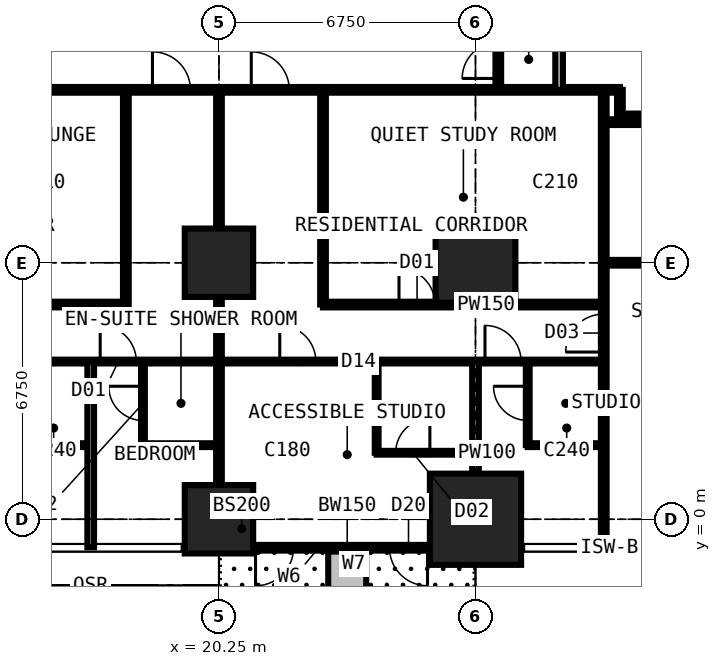
"""IFC4 building model, lengths in metres.
Left out: names, types, materials, properties, quantities, classifications, styles, units other than length and angle.
Written with IfcOpenShell. Run it as: python <this file> out.ifc"""

import sys

from ifc_helpers import new_model, si_unit, direction, frame, frame_2d, origin, origin_2d, place, context, subcontext, project, spatial, rectangle, extrude, element, fill, save


model = new_model("IFC4")
c1 = context("Model", 3, precision=1e-05, world=origin(), true_north=direction((0.0, 1.0)))
c2 = subcontext(c1, "Body", "Model", "MODEL_VIEW")
j1 = project(units=[si_unit("LENGTHUNIT", "METRE"), si_unit("PLANEANGLEUNIT", "RADIAN")], contexts=[c1])
p1 = place(None, origin())
s1 = spatial("IfcSite", under=j1, at=p1, CompositionType="ELEMENT")
p2 = place(p1, origin())
s2 = spatial("IfcBuilding", under=s1, at=p2, CompositionType="ELEMENT")
p3 = place(p2, frame((0.0, 0.0, 83.7)))
s3 = spatial("IfcBuildingStorey", under=s2, at=p3, CompositionType="ELEMENT", Elevation=83.7)
for number, where, z_axis, x_axis in (
    (1, (20.25, 0.0, 0.0), (0.0, 0.0, 1.0), (1.0, 0.0, 0.0)),
    (2, (20.25, 6.75, 0.0), (0.0, 0.0, 1.0), (1.0, 0.0, 0.0)),
):
    element("IfcColumn", number, at=place(p3, frame(where, z_axis=z_axis, x_axis=x_axis)), inside=s3, PredefinedType="COLUMN", context=c2, shape_type="SweptSolid", body=[
        extrude(rectangle(XDim=1.8, YDim=1.8, at=origin_2d()), origin(), (0.0, 0.0, 1.0), 3.6),
    ])
p4 = place(p3, frame((27.0, 0.0, 0.0), z_axis=(0.0, 0.0, 1.0), x_axis=(1.0, 0.0, 0.0)))
e3 = element("IfcColumn", 3, at=p4, inside=s3, PredefinedType="COLUMN", context=c2, shape_type="SweptSolid", body=[
    extrude(rectangle(XDim=2.4, YDim=2.4, at=origin_2d()), origin(), (0.0, 0.0, 1.0), 3.6),
])
p5 = place(p3, frame((27.0, 6.75, 0.0), z_axis=(0.0, 0.0, 1.0), x_axis=(1.0, 0.0, 0.0)))
e4 = element("IfcColumn", 4, at=p5, inside=s3, PredefinedType="COLUMN", context=c2, shape_type="SweptSolid", body=[
    extrude(rectangle(XDim=2.1, YDim=2.1, at=origin_2d()), origin(), (0.0, 0.0, 1.0), 3.6),
])
p6 = place(p3, frame((27.0, -0.75, 0.0), z_axis=(0.0, 0.0, 1.0), x_axis=(-1.0, 0.0, 0.0)))
e5 = element("IfcWall", 5, at=p6, inside=s3, PredefinedType="SOLIDWALL", context=c2, shape_type="SweptSolid", body=[
    extrude(rectangle(XDim=6.75, YDim=0.15, at=frame_2d((3.375, 0.0))), origin(), (0.0, 0.0, 1.0), 3.375),
])
p7 = place(p6, frame((1.262, 0.0, 0.0)))
e6 = element("IfcOpeningElement", 6, at=p7, cuts=e5, PredefinedType="OPENING", context=c2, shape_type="SweptSolid", body=[
    extrude(rectangle(XDim=1.0, YDim=2.2, at=frame_2d((0.5, 1.1))), frame((0.0, 0.085, 0.0), z_axis=(0.0, -1.0, 0.0), x_axis=(1.0, 0.0, 0.0)), (0.0, 0.0, 1.0), 0.17),
])
p8 = place(p6, frame((2.325, 0.0, 0.9)))
e7 = element("IfcOpeningElement", 7, at=p8, cuts=e5, PredefinedType="OPENING", context=c2, shape_type="SweptSolid", body=[
    extrude(rectangle(XDim=0.9, YDim=1.8, at=frame_2d((0.45, 0.9))), frame((0.0, 0.085, 0.0), z_axis=(0.0, -1.0, 0.0), x_axis=(1.0, 0.0, 0.0)), (0.0, 0.0, 1.0), 0.17),
])
p9 = place(p6, frame((4.788, 0.0, 0.0)))
e8 = element("IfcOpeningElement", 8, at=p9, cuts=e5, PredefinedType="OPENING", context=c2, shape_type="SweptSolid", body=[
    extrude(rectangle(XDim=1.0, YDim=2.2, at=frame_2d((0.5, 1.1))), frame((0.0, 0.085, 0.0), z_axis=(0.0, -1.0, 0.0), x_axis=(1.0, 0.0, 0.0)), (0.0, 0.0, 1.0), 0.17),
])
p10 = place(p6, frame((3.525, 0.0, 0.9)))
e9 = element("IfcOpeningElement", 9, at=p10, cuts=e5, PredefinedType="OPENING", context=c2, shape_type="SweptSolid", body=[
    extrude(rectangle(XDim=1.2, YDim=1.8, at=frame_2d((0.6, 0.9))), frame((0.0, 0.085, 0.0), z_axis=(0.0, -1.0, 0.0), x_axis=(1.0, 0.0, 0.0)), (0.0, 0.0, 1.0), 0.17),
])
p11 = place(p3, frame((23.625, -0.85, 0.0), z_axis=(0.0, 0.0, 1.0), x_axis=(0.0, -1.0, 0.0)))
e10 = element("IfcWall", 10, at=p11, inside=s3, PredefinedType="USERDEFINED", context=c2, shape_type="SweptSolid", body=[
    extrude(rectangle(XDim=2.2, YDim=1.0, at=frame_2d((1.1, 0.0))), origin(), (0.0, 0.0, 1.0), 0.9),
])
p12 = place(p3, frame((6.75, 4.15, 0.0), z_axis=(0.0, 0.0, 1.0), x_axis=(1.0, 0.0, 0.0)))
e11 = element("IfcWall", 11, at=p12, inside=s3, PredefinedType="PARTITIONING", context=c2, shape_type="SweptSolid", body=[
    extrude(rectangle(XDim=23.625, YDim=0.1, at=frame_2d((11.812, 0.0))), origin(), (0.0, 0.0, 1.0), 3.375),
])
p13 = place(p12, frame((0.2, 0.0, 0.0)))
e12 = element("IfcOpeningElement", 12, at=p13, cuts=e11, PredefinedType="OPENING", context=c2, shape_type="SweptSolid", body=[
    extrude(rectangle(XDim=0.95, YDim=2.2, at=frame_2d((0.475, 1.1))), frame((0.0, 0.06, 0.0), z_axis=(0.0, -1.0, 0.0), x_axis=(1.0, 0.0, 0.0)), (0.0, 0.0, 1.0), 0.12),
])
p14 = place(p12, frame((3.625, 0.0, 0.0)))
e13 = element("IfcOpeningElement", 13, at=p14, cuts=e11, PredefinedType="OPENING", context=c2, shape_type="SweptSolid", body=[
    extrude(rectangle(XDim=0.95, YDim=2.2, at=frame_2d((0.475, 1.1))), frame((0.0, 0.06, 0.0), z_axis=(0.0, -1.0, 0.0), x_axis=(1.0, 0.0, 0.0)), (0.0, 0.0, 1.0), 0.12),
])
p15 = place(p12, frame((7.0, 0.0, 0.0)))
e14 = element("IfcOpeningElement", 14, at=p15, cuts=e11, PredefinedType="OPENING", context=c2, shape_type="SweptSolid", body=[
    extrude(rectangle(XDim=0.95, YDim=2.2, at=frame_2d((0.475, 1.1))), frame((0.0, 0.06, 0.0), z_axis=(0.0, -1.0, 0.0), x_axis=(1.0, 0.0, 0.0)), (0.0, 0.0, 1.0), 0.12),
])
p16 = place(p12, frame((10.375, 0.0, 0.0)))
e15 = element("IfcOpeningElement", 15, at=p16, cuts=e11, PredefinedType="OPENING", context=c2, shape_type="SweptSolid", body=[
    extrude(rectangle(XDim=0.95, YDim=2.2, at=frame_2d((0.475, 1.1))), frame((0.0, 0.06, 0.0), z_axis=(0.0, -1.0, 0.0), x_axis=(1.0, 0.0, 0.0)), (0.0, 0.0, 1.0), 0.12),
])
p17 = place(p12, frame((15.1, 0.0, 0.0)))
e16 = element("IfcOpeningElement", 16, at=p17, cuts=e11, PredefinedType="OPENING", context=c2, shape_type="SweptSolid", body=[
    extrude(rectangle(XDim=0.95, YDim=2.2, at=frame_2d((0.475, 1.1))), frame((0.0, 0.06, 0.0), z_axis=(0.0, -1.0, 0.0), x_axis=(1.0, 0.0, 0.0)), (0.0, 0.0, 1.0), 0.12),
])
p18 = place(p12, frame((20.5, 0.0, 0.0)))
e17 = element("IfcOpeningElement", 17, at=p18, cuts=e11, PredefinedType="OPENING", context=c2, shape_type="SweptSolid", body=[
    extrude(rectangle(XDim=0.95, YDim=2.2, at=frame_2d((0.475, 1.1))), frame((0.0, 0.06, 0.0), z_axis=(0.0, -1.0, 0.0), x_axis=(1.0, 0.0, 0.0)), (0.0, 0.0, 1.0), 0.12),
])
p19 = place(p3, frame((9.2, 5.65, 0.0), z_axis=(0.0, 0.0, 1.0), x_axis=(1.0, 0.0, 0.0)))
e18 = element("IfcWall", 18, at=p19, inside=s3, PredefinedType="PARTITIONING", context=c2, shape_type="SweptSolid", body=[
    extrude(rectangle(XDim=8.6, YDim=0.15, at=frame_2d((4.3, 0.0))), origin(), (0.0, 0.0, 1.0), 3.375),
])
p20 = place(p3, frame((10.125, 11.3, 0.0), z_axis=(0.0, 0.0, 1.0), x_axis=(1.0, 0.0, 0.0)))
e19 = element("IfcWall", 19, at=p20, inside=s3, PredefinedType="PARTITIONING", context=c2, shape_type="SweptSolid", body=[
    extrude(rectangle(XDim=20.675, YDim=0.15, at=frame_2d((10.337, 0.0))), origin(), (0.0, 0.0, 1.0), 3.375),
])
p21 = place(p20, frame((8.375, 0.0, 0.0)))
e20 = element("IfcOpeningElement", 20, at=p21, cuts=e19, PredefinedType="OPENING", context=c2, shape_type="SweptSolid", body=[
    extrude(rectangle(XDim=1.0, YDim=2.2, at=frame_2d((0.5, 1.1))), frame((0.0, 0.085, 0.0), z_axis=(0.0, -1.0, 0.0), x_axis=(1.0, 0.0, 0.0)), (0.0, 0.0, 1.0), 0.17),
])
p22 = place(p20, frame((10.975, 0.0, 0.0)))
e21 = element("IfcOpeningElement", 21, at=p22, cuts=e19, PredefinedType="OPENING", context=c2, shape_type="SweptSolid", body=[
    extrude(rectangle(XDim=1.0, YDim=2.2, at=frame_2d((0.5, 1.1))), frame((0.0, 0.085, 0.0), z_axis=(0.0, -1.0, 0.0), x_axis=(1.0, 0.0, 0.0)), (0.0, 0.0, 1.0), 0.17),
])
p23 = place(p20, frame((3.925, 0.0, 0.0)))
e22 = element("IfcOpeningElement", 22, at=p23, cuts=e19, PredefinedType="OPENING", context=c2, shape_type="SweptSolid", body=[
    extrude(rectangle(XDim=0.95, YDim=2.2, at=frame_2d((0.475, 1.1))), frame((0.0, 0.085, 0.0), z_axis=(0.0, -1.0, 0.0), x_axis=(1.0, 0.0, 0.0)), (0.0, 0.0, 1.0), 0.17),
])
p24 = place(p3, frame((14.875, 1.95, 0.0), z_axis=(0.0, 0.0, 1.0), x_axis=(1.0, 0.0, 0.0)))
e23 = element("IfcWall", 23, at=p24, inside=s3, PredefinedType="PARTITIONING", context=c2, shape_type="SweptSolid", body=[
    extrude(rectangle(XDim=2.0, YDim=0.1, at=frame_2d((1.0, 0.0))), origin(), (0.0, 0.0, 1.0), 3.375),
])
p25 = place(p3, frame((16.875, -0.734, 0.0), z_axis=(0.0, 0.0, 1.0), x_axis=(0.0, 1.0, 0.0)))
e24 = element("IfcWall", 24, at=p25, inside=s3, PredefinedType="PARTITIONING", context=c2, shape_type="SweptSolid", body=[
    extrude(rectangle(XDim=4.884, YDim=0.175, at=frame_2d((2.442, 0.0))), origin(), (0.0, 0.0, 1.0), 3.375),
])
p26 = place(p3, frame((17.8, 5.65, 0.0), z_axis=(0.0, 0.0, 1.0), x_axis=(0.0, 1.0, 0.0)))
e25 = element("IfcWall", 25, at=p26, inside=s3, PredefinedType="PARTITIONING", context=c2, shape_type="SweptSolid", body=[
    extrude(rectangle(XDim=5.65, YDim=0.15, at=frame_2d((2.825, 0.0))), origin(), (0.0, 0.0, 1.0), 3.375),
])
p27 = place(p3, frame((18.25, 1.95, 0.0), z_axis=(0.0, 0.0, 1.0), x_axis=(0.0, 1.0, 0.0)))
e26 = element("IfcWall", 26, at=p27, inside=s3, PredefinedType="PARTITIONING", context=c2, shape_type="SweptSolid", body=[
    extrude(rectangle(XDim=2.2, YDim=0.1, at=frame_2d((1.1, 0.0))), origin(), (0.0, 0.0, 1.0), 3.375),
])
p28 = place(p27, frame((0.65, 0.0, 0.0)))
e27 = element("IfcOpeningElement", 27, at=p28, cuts=e26, PredefinedType="OPENING", context=c2, shape_type="SweptSolid", body=[
    extrude(rectangle(XDim=0.9, YDim=2.2, at=frame_2d((0.45, 1.1))), frame((0.0, 0.06, 0.0), z_axis=(0.0, -1.0, 0.0), x_axis=(1.0, 0.0, 0.0)), (0.0, 0.0, 1.0), 0.12),
])
p29 = place(p3, frame((18.25, 1.95, 0.0), z_axis=(0.0, 0.0, 1.0), x_axis=(1.0, 0.0, 0.0)))
e28 = element("IfcWall", 28, at=p29, inside=s3, PredefinedType="PARTITIONING", context=c2, shape_type="SweptSolid", body=[
    extrude(rectangle(XDim=2.0, YDim=0.1, at=frame_2d((1.0, 0.0))), origin(), (0.0, 0.0, 1.0), 3.375),
])
p30 = place(p3, frame((20.25, -0.734, 0.0), z_axis=(0.0, 0.0, 1.0), x_axis=(0.0, 1.0, 0.0)))
e29 = element("IfcWall", 29, at=p30, inside=s3, PredefinedType="PARTITIONING", context=c2, shape_type="SweptSolid", body=[
    extrude(rectangle(XDim=12.034, YDim=0.15, at=frame_2d((6.017, 0.0))), origin(), (0.0, 0.0, 1.0), 2.61),
])
p31 = place(p3, frame((22.988, 5.65, 0.0), z_axis=(0.0, 0.0, 1.0), x_axis=(1.0, 0.0, 0.0)))
e30 = element("IfcWall", 30, at=p31, inside=s3, PredefinedType="PARTITIONING", context=c2, shape_type="SweptSolid", body=[
    extrude(rectangle(XDim=7.387, YDim=0.15, at=frame_2d((3.694, 0.0))), origin(), (0.0, 0.0, 1.0), 3.375),
])
p32 = place(p31, frame((2.0, 0.0, 0.0)))
e31 = element("IfcOpeningElement", 31, at=p32, cuts=e30, PredefinedType="OPENING", context=c2, shape_type="SweptSolid", body=[
    extrude(rectangle(XDim=0.95, YDim=2.2, at=frame_2d((0.475, 1.1))), frame((0.0, 0.085, 0.0), z_axis=(0.0, -1.0, 0.0), x_axis=(1.0, 0.0, 0.0)), (0.0, 0.0, 1.0), 0.17),
])
p33 = place(p3, frame((22.988, 5.65, 0.0), z_axis=(0.0, 0.0, 1.0), x_axis=(0.0, 1.0, 0.0)))
e32 = element("IfcWall", 32, at=p33, inside=s3, PredefinedType="PARTITIONING", context=c2, shape_type="SweptSolid", body=[
    extrude(rectangle(XDim=5.65, YDim=0.15, at=frame_2d((2.825, 0.0))), origin(), (0.0, 0.0, 1.0), 3.375),
])
p34 = place(p3, frame((24.4, 1.75, 0.0), z_axis=(0.0, 0.0, 1.0), x_axis=(0.0, 1.0, 0.0)))
e33 = element("IfcWall", 33, at=p34, inside=s3, PredefinedType="PARTITIONING", context=c2, shape_type="SweptSolid", body=[
    extrude(rectangle(XDim=2.4, YDim=0.1, at=frame_2d((1.2, 0.0))), origin(), (0.0, 0.0, 1.0), 3.375),
])
p35 = place(p3, frame((24.4, 1.75, 0.0), z_axis=(0.0, 0.0, 1.0), x_axis=(1.0, 0.0, 0.0)))
e34 = element("IfcWall", 34, at=p35, inside=s3, PredefinedType="PARTITIONING", context=c2, shape_type="SweptSolid", body=[
    extrude(rectangle(XDim=2.6, YDim=0.1, at=frame_2d((1.3, 0.0))), origin(), (0.0, 0.0, 1.0), 3.375),
])
p36 = place(p35, frame((0.5, 0.0, 0.0)))
e35 = element("IfcOpeningElement", 35, at=p36, cuts=e34, PredefinedType="OPENING", context=c2, shape_type="SweptSolid", body=[
    extrude(rectangle(XDim=0.9, YDim=2.2, at=frame_2d((0.45, 1.1))), frame((0.0, 0.06, 0.0), z_axis=(0.0, -1.0, 0.0), x_axis=(1.0, 0.0, 0.0)), (0.0, 0.0, 1.0), 0.12),
])
p37 = place(p3, frame((27.0, -0.734, 0.0), z_axis=(0.0, 0.0, 1.0), x_axis=(0.0, 1.0, 0.0)))
e36 = element("IfcWall", 36, at=p37, inside=s3, PredefinedType="PARTITIONING", context=c2, shape_type="SweptSolid", body=[
    extrude(rectangle(XDim=4.884, YDim=0.175, at=frame_2d((2.442, 0.0))), origin(), (0.0, 0.0, 1.0), 2.877),
])
p38 = place(p3, frame((27.6, 11.3, 0.0), z_axis=(0.0, 0.0, 1.0), x_axis=(0.0, 1.0, 0.0)))
e37 = element("IfcWall", 37, at=p38, inside=s3, PredefinedType="PARTITIONING", context=c2, shape_type="SweptSolid", body=[
    extrude(rectangle(XDim=1.6, YDim=0.15, at=frame_2d((0.8, 0.0))), origin(), (0.0, 0.0, 1.0), 3.375),
])
p39 = place(p38, frame((0.3, 0.0, 0.0)))
e38 = element("IfcOpeningElement", 38, at=p39, cuts=e37, PredefinedType="OPENING", context=c2, shape_type="SweptSolid", body=[
    extrude(rectangle(XDim=0.95, YDim=2.2, at=frame_2d((0.475, 1.1))), frame((0.0, 0.085, 0.0), z_axis=(0.0, -1.0, 0.0), x_axis=(1.0, 0.0, 0.0)), (0.0, 0.0, 1.0), 0.17),
])
p40 = place(p3, frame((28.375, 1.95, 0.0), z_axis=(0.0, 0.0, 1.0), x_axis=(0.0, 1.0, 0.0)))
e39 = element("IfcWall", 39, at=p40, inside=s3, PredefinedType="PARTITIONING", context=c2, shape_type="SweptSolid", body=[
    extrude(rectangle(XDim=2.2, YDim=0.1, at=frame_2d((1.1, 0.0))), origin(), (0.0, 0.0, 1.0), 3.375),
])
p41 = place(p40, frame((0.65, 0.0, 0.0)))
e40 = element("IfcOpeningElement", 40, at=p41, cuts=e39, PredefinedType="OPENING", context=c2, shape_type="SweptSolid", body=[
    extrude(rectangle(XDim=0.9, YDim=2.2, at=frame_2d((0.45, 1.1))), frame((0.0, 0.06, 0.0), z_axis=(0.0, -1.0, 0.0), x_axis=(1.0, 0.0, 0.0)), (0.0, 0.0, 1.0), 0.12),
])
p42 = place(p3, frame((28.375, 1.95, 0.0), z_axis=(0.0, 0.0, 1.0), x_axis=(1.0, 0.0, 0.0)))
e41 = element("IfcWall", 41, at=p42, inside=s3, PredefinedType="PARTITIONING", context=c2, shape_type="SweptSolid", body=[
    extrude(rectangle(XDim=2.0, YDim=0.1, at=frame_2d((1.0, 0.0))), origin(), (0.0, 0.0, 1.0), 3.375),
])
p43 = place(p3, frame((29.2, 11.3, 0.0), z_axis=(0.0, 0.0, 1.0), x_axis=(0.0, 1.0, 0.0)))
e42 = element("IfcWall", 42, at=p43, inside=s3, PredefinedType="PARTITIONING", context=c2, shape_type="SweptSolid", body=[
    extrude(rectangle(XDim=17.9, YDim=0.2, at=frame_2d((8.95, 0.0))), origin(), (0.0, 0.0, 1.0), 3.375),
])
p44 = place(p43, frame((8.35, 0.0, 0.0)))
e43 = element("IfcOpeningElement", 43, at=p44, cuts=e42, PredefinedType="OPENING", context=c2, shape_type="SweptSolid", body=[
    extrude(rectangle(XDim=1.2, YDim=2.2, at=frame_2d((0.6, 1.1))), frame((0.0, 0.11, 0.0), z_axis=(0.0, -1.0, 0.0), x_axis=(1.0, 0.0, 0.0)), (0.0, 0.0, 1.0), 0.22),
])
p45 = place(p3, frame((30.375, -0.734, 0.0), z_axis=(0.0, 0.0, 1.0), x_axis=(0.0, 1.0, 0.0)))
e44 = element("IfcWall", 44, at=p45, inside=s3, PredefinedType="PARTITIONING", context=c2, shape_type="SweptSolid", body=[
    extrude(rectangle(XDim=12.034, YDim=0.15, at=frame_2d((6.017, 0.0))), origin(), (0.0, 0.0, 1.0), 3.375),
])
p46 = place(p45, frame((5.134, 0.0, 0.0)))
e45 = element("IfcOpeningElement", 45, at=p46, cuts=e44, PredefinedType="OPENING", context=c2, shape_type="SweptSolid", body=[
    extrude(rectangle(XDim=1.0, YDim=2.2, at=frame_2d((0.5, 1.1))), frame((0.0, 0.085, 0.0), z_axis=(0.0, -1.0, 0.0), x_axis=(1.0, 0.0, 0.0)), (0.0, 0.0, 1.0), 0.17),
])
p47 = place(p3, frame((30.375, 6.75, 0.0), z_axis=(0.0, 0.0, 1.0), x_axis=(1.0, 0.0, 0.0)))
e46 = element("IfcWall", 46, at=p47, inside=s3, PredefinedType="PARTITIONING", context=c2, shape_type="SweptSolid", body=[
    extrude(rectangle(XDim=5.975, YDim=0.15, at=frame_2d((2.988, 0.0))), origin(), (0.0, 0.0, 1.0), 2.877),
])
p48 = place(p3, frame((30.375, 10.45, 0.0), z_axis=(0.0, 0.0, 1.0), x_axis=(1.0, 0.0, 0.0)))
e47 = element("IfcWall", 47, at=p48, inside=s3, PredefinedType="PARTITIONING", context=c2, shape_type="SweptSolid", body=[
    extrude(rectangle(XDim=4.475, YDim=0.15, at=frame_2d((2.238, 0.0))), origin(), (0.0, 0.0, 1.0), 3.375),
])
p49 = place(p48, frame((2.35, 0.0, 0.0)))
e48 = element("IfcOpeningElement", 48, at=p49, cuts=e47, PredefinedType="OPENING", context=c2, shape_type="SweptSolid", body=[
    extrude(rectangle(XDim=0.95, YDim=2.2, at=frame_2d((0.475, 1.1))), frame((0.0, 0.085, 0.0), z_axis=(0.0, -1.0, 0.0), x_axis=(1.0, 0.0, 0.0)), (0.0, 0.0, 1.0), 0.17),
])
p50 = place(p3, frame((30.8, 10.6, 0.0), z_axis=(0.0, 0.0, 1.0), x_axis=(0.0, 1.0, 0.0)))
e49 = element("IfcWall", 49, at=p50, inside=s3, PredefinedType="PARTITIONING", context=c2, shape_type="SweptSolid", body=[
    extrude(rectangle(XDim=0.7, YDim=0.15, at=frame_2d((0.35, 0.0))), origin(), (0.0, 0.0, 1.0), 3.375),
])
p51 = place(p3, frame((30.8, 10.6, 0.0), z_axis=(0.0, 0.0, 1.0), x_axis=(1.0, 0.0, 0.0)))
e50 = element("IfcWall", 50, at=p51, inside=s3, PredefinedType="PARTITIONING", context=c2, shape_type="SweptSolid", body=[
    extrude(rectangle(XDim=1.85, YDim=0.15, at=frame_2d((0.925, 0.0))), origin(), (0.0, 0.0, 1.0), 3.375),
])
p52 = place(p7, origin())
e51 = element("IfcDoor", 51, at=p52, inside=s3, OperationType="SINGLE_SWING_LEFT", PredefinedType="DOOR", context=c2, shape_type="SweptSolid", body=[
    extrude(rectangle(XDim=1.0, YDim=2.2, at=frame_2d((0.5, 1.1))), frame((0.0, 0.025, 0.0), z_axis=(0.0, -1.0, 0.0), x_axis=(1.0, 0.0, 0.0)), (0.0, 0.0, 1.0), 0.05),
])
fill(e6, e51)
p53 = place(p8, origin())
e52 = element("IfcWindow", 52, at=p53, inside=s3, PartitioningType="SINGLE_PANEL", PredefinedType="WINDOW", context=c2, shape_type="SweptSolid", body=[
    extrude(rectangle(XDim=0.9, YDim=1.8, at=frame_2d((0.45, 0.9))), frame((0.0, 0.03, 0.0), z_axis=(0.0, -1.0, 0.0), x_axis=(1.0, 0.0, 0.0)), (0.0, 0.0, 1.0), 0.06),
])
fill(e7, e52)
p54 = place(p9, origin())
e53 = element("IfcDoor", 53, at=p54, inside=s3, OperationType="SINGLE_SWING_RIGHT", PredefinedType="DOOR", context=c2, shape_type="SweptSolid", body=[
    extrude(rectangle(XDim=1.0, YDim=2.2, at=frame_2d((0.5, 1.1))), frame((0.0, 0.025, 0.0), z_axis=(0.0, -1.0, 0.0), x_axis=(1.0, 0.0, 0.0)), (0.0, 0.0, 1.0), 0.05),
])
fill(e8, e53)
p55 = place(p10, origin())
e54 = element("IfcWindow", 54, at=p55, inside=s3, PartitioningType="SINGLE_PANEL", PredefinedType="WINDOW", context=c2, shape_type="SweptSolid", body=[
    extrude(rectangle(XDim=1.2, YDim=1.8, at=frame_2d((0.6, 0.9))), frame((0.0, 0.03, 0.0), z_axis=(0.0, -1.0, 0.0), x_axis=(1.0, 0.0, 0.0)), (0.0, 0.0, 1.0), 0.06),
])
fill(e9, e54)
p56 = place(p39, origin())
e55 = element("IfcDoor", 55, at=p56, inside=s3, OperationType="SINGLE_SWING_LEFT", PredefinedType="DOOR", context=c2, shape_type="SweptSolid", body=[
    extrude(rectangle(XDim=0.95, YDim=2.2, at=frame_2d((0.475, 1.1))), frame((0.0, 0.025, 0.0), z_axis=(0.0, -1.0, 0.0), x_axis=(1.0, 0.0, 0.0)), (0.0, 0.0, 1.0), 0.05),
])
fill(e38, e55)
p57 = place(p16, origin())
e56 = element("IfcDoor", 56, at=p57, inside=s3, OperationType="SINGLE_SWING_LEFT", PredefinedType="DOOR", context=c2, shape_type="SweptSolid", body=[
    extrude(rectangle(XDim=0.95, YDim=2.2, at=frame_2d((0.475, 1.1))), frame((0.0, 0.025, 0.0), z_axis=(0.0, -1.0, 0.0), x_axis=(1.0, 0.0, 0.0)), (0.0, 0.0, 1.0), 0.05),
])
fill(e15, e56)
p58 = place(p28, origin())
e57 = element("IfcDoor", 57, at=p58, inside=s3, OperationType="SINGLE_SWING_RIGHT", PredefinedType="DOOR", context=c2, shape_type="SweptSolid", body=[
    extrude(rectangle(XDim=0.9, YDim=2.2, at=frame_2d((0.45, 1.1))), frame((0.0, 0.025, 0.0), z_axis=(0.0, -1.0, 0.0), x_axis=(1.0, 0.0, 0.0)), (0.0, 0.0, 1.0), 0.05),
])
fill(e27, e57)
p59 = place(p21, origin())
e58 = element("IfcDoor", 58, at=p59, inside=s3, OperationType="SINGLE_SWING_LEFT", PredefinedType="DOOR", context=c2, shape_type="SweptSolid", body=[
    extrude(rectangle(XDim=1.0, YDim=2.2, at=frame_2d((0.5, 1.1))), frame((0.0, 0.025, 0.0), z_axis=(0.0, -1.0, 0.0), x_axis=(1.0, 0.0, 0.0)), (0.0, 0.0, 1.0), 0.05),
])
fill(e20, e58)
p60 = place(p17, origin())
e59 = element("IfcDoor", 59, at=p60, inside=s3, OperationType="SINGLE_SWING_LEFT", PredefinedType="DOOR", context=c2, shape_type="SweptSolid", body=[
    extrude(rectangle(XDim=0.95, YDim=2.2, at=frame_2d((0.475, 1.1))), frame((0.0, 0.025, 0.0), z_axis=(0.0, -1.0, 0.0), x_axis=(1.0, 0.0, 0.0)), (0.0, 0.0, 1.0), 0.05),
])
fill(e16, e59)
p61 = place(p36, origin())
e60 = element("IfcDoor", 60, at=p61, inside=s3, OperationType="SINGLE_SWING_RIGHT", PredefinedType="DOOR", context=c2, shape_type="SweptSolid", body=[
    extrude(rectangle(XDim=0.9, YDim=2.2, at=frame_2d((0.45, 1.1))), frame((0.0, 0.025, 0.0), z_axis=(0.0, -1.0, 0.0), x_axis=(1.0, 0.0, 0.0)), (0.0, 0.0, 1.0), 0.05),
])
fill(e35, e60)
p62 = place(p18, origin())
e61 = element("IfcDoor", 61, at=p62, inside=s3, OperationType="SINGLE_SWING_LEFT", PredefinedType="DOOR", context=c2, shape_type="SweptSolid", body=[
    extrude(rectangle(XDim=0.95, YDim=2.2, at=frame_2d((0.475, 1.1))), frame((0.0, 0.025, 0.0), z_axis=(0.0, -1.0, 0.0), x_axis=(1.0, 0.0, 0.0)), (0.0, 0.0, 1.0), 0.05),
])
fill(e17, e61)
p63 = place(p41, origin())
e62 = element("IfcDoor", 62, at=p63, inside=s3, OperationType="SINGLE_SWING_RIGHT", PredefinedType="DOOR", context=c2, shape_type="SweptSolid", body=[
    extrude(rectangle(XDim=0.9, YDim=2.2, at=frame_2d((0.45, 1.1))), frame((0.0, 0.025, 0.0), z_axis=(0.0, -1.0, 0.0), x_axis=(1.0, 0.0, 0.0)), (0.0, 0.0, 1.0), 0.05),
])
fill(e40, e62)
p64 = place(p22, origin())
e63 = element("IfcDoor", 63, at=p64, inside=s3, OperationType="SINGLE_SWING_LEFT", PredefinedType="DOOR", context=c2, shape_type="SweptSolid", body=[
    extrude(rectangle(XDim=1.0, YDim=2.2, at=frame_2d((0.5, 1.1))), frame((0.0, 0.025, 0.0), z_axis=(0.0, -1.0, 0.0), x_axis=(1.0, 0.0, 0.0)), (0.0, 0.0, 1.0), 0.05),
])
fill(e21, e63)
p65 = place(p32, origin())
e64 = element("IfcDoor", 64, at=p65, inside=s3, OperationType="SINGLE_SWING_LEFT", PredefinedType="DOOR", context=c2, shape_type="SweptSolid", body=[
    extrude(rectangle(XDim=0.95, YDim=2.2, at=frame_2d((0.475, 1.1))), frame((0.0, 0.025, 0.0), z_axis=(0.0, -1.0, 0.0), x_axis=(1.0, 0.0, 0.0)), (0.0, 0.0, 1.0), 0.05),
])
fill(e31, e64)
p66 = place(p46, origin())
e65 = element("IfcDoor", 65, at=p66, inside=s3, OperationType="SINGLE_SWING_LEFT", PredefinedType="DOOR", context=c2, shape_type="SweptSolid", body=[
    extrude(rectangle(XDim=1.0, YDim=2.2, at=frame_2d((0.5, 1.1))), frame((0.0, 0.025, 0.0), z_axis=(0.0, -1.0, 0.0), x_axis=(1.0, 0.0, 0.0)), (0.0, 0.0, 1.0), 0.05),
])
fill(e45, e65)
save(model, sys.argv[1])
